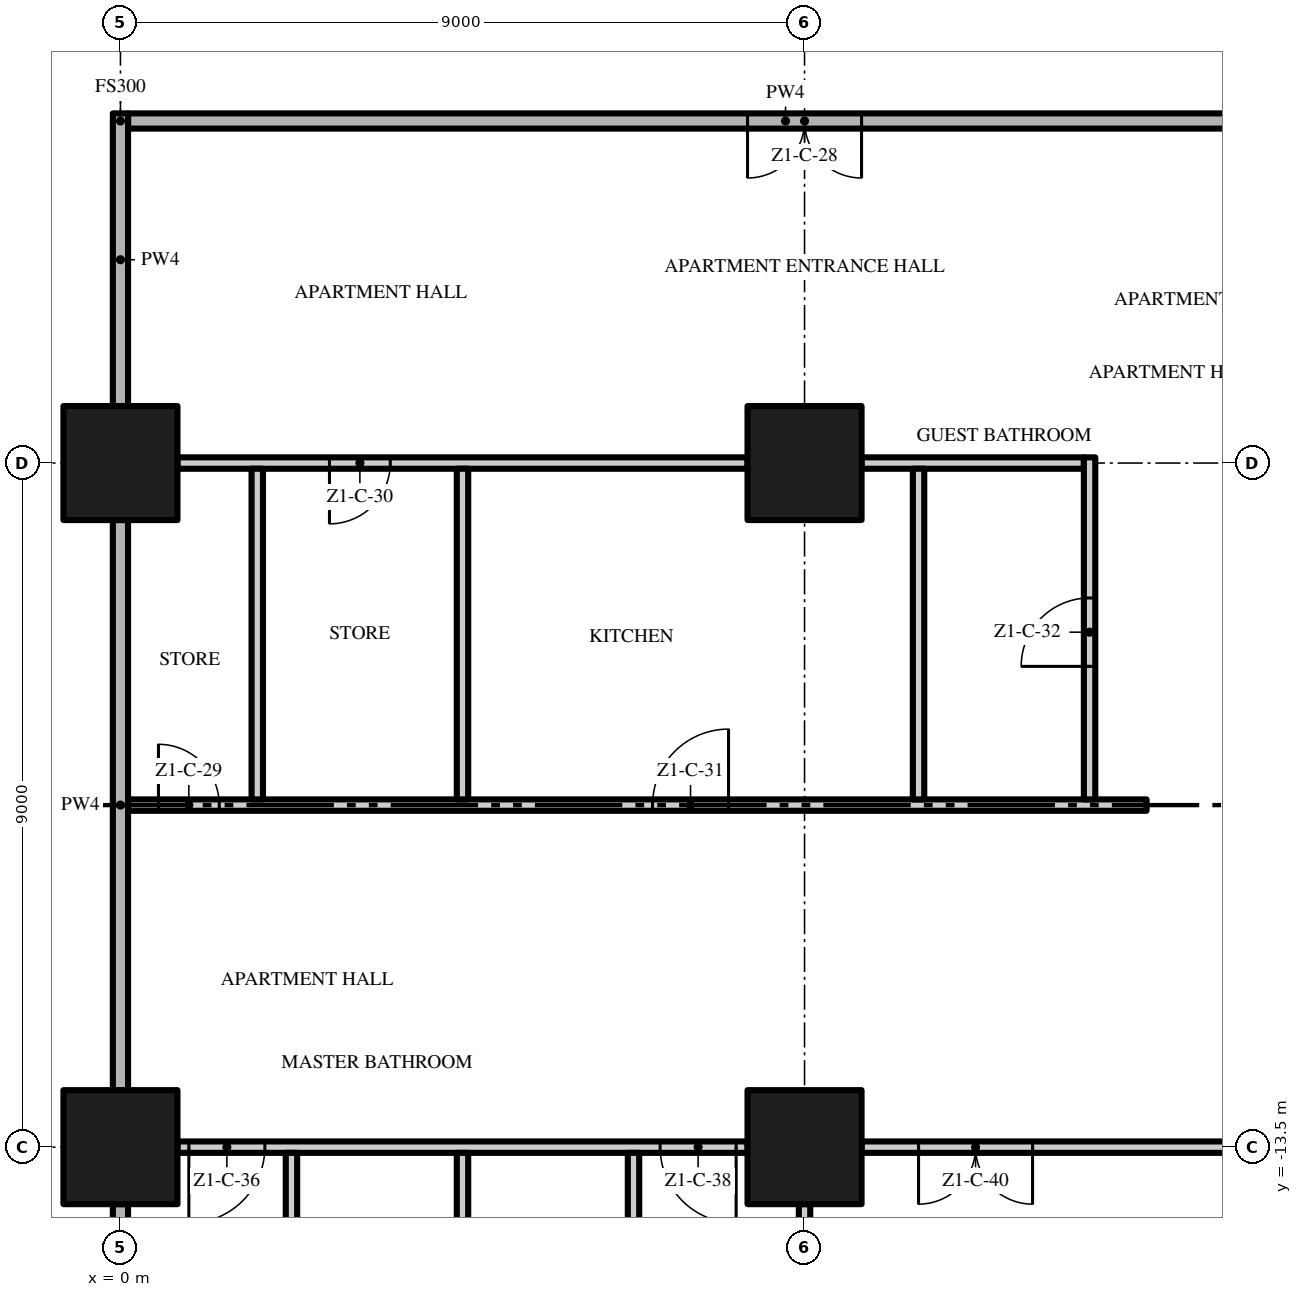
"""IFC4 building model, lengths in metres.
Left out: names, types, materials, properties, quantities, classifications, styles, units other than length and angle.
Written with IfcOpenShell. Run it as: python <this file> out.ifc"""

import sys

from ifc_helpers import new_model, si_unit, direction, frame, frame_2d, origin, origin_2d, place, context, subcontext, project, spatial, rectangle, extrude, element, fill, save


model = new_model("IFC4")
c1 = context("Model", 3, precision=1e-05, world=origin(), true_north=direction((0.0, 1.0)))
c2 = subcontext(c1, "Body", "Model", "MODEL_VIEW")
j1 = project(units=[si_unit("LENGTHUNIT", "METRE"), si_unit("PLANEANGLEUNIT", "RADIAN")], contexts=[c1])
p1 = place(None, origin())
s1 = spatial("IfcSite", under=j1, at=p1, CompositionType="ELEMENT")
p2 = place(p1, origin())
s2 = spatial("IfcBuilding", under=s1, at=p2, CompositionType="ELEMENT")
p3 = place(p2, frame((0.0, 0.0, 45.4)))
s3 = spatial("IfcBuildingStorey", under=s2, at=p3, CompositionType="ELEMENT", Elevation=45.4)
for number, where, z_axis, x_axis in (
    (1, (0.0, -13.5, 0.0), (0.0, 0.0, 1.0), (1.0, 0.0, 0.0)),
    (2, (0.0, -4.5, 0.0), (0.0, 0.0, 1.0), (1.0, 0.0, 0.0)),
    (3, (9.0, -13.5, 0.0), (0.0, 0.0, 1.0), (1.0, 0.0, 0.0)),
    (4, (9.0, -4.5, 0.0), (0.0, 0.0, 1.0), (1.0, 0.0, 0.0)),
):
    element("IfcColumn", number, at=place(p3, frame(where, z_axis=z_axis, x_axis=x_axis)), inside=s3, PredefinedType="COLUMN", context=c2, shape_type="SweptSolid", body=[
        extrude(rectangle(XDim=1.5, YDim=1.5, at=origin_2d()), origin(), (0.0, 0.0, 1.0), 3.5),
    ])
p4 = place(p3, frame((8.25, -13.5, 0.0), z_axis=(0.0, 0.0, 1.0), x_axis=(-1.0, 0.0, 0.0)))
e5 = element("IfcWall", 5, at=p4, inside=s3, PredefinedType="PARTITIONING", context=c2, shape_type="SweptSolid", body=[
    extrude(rectangle(XDim=7.5, YDim=0.15, at=frame_2d((3.75, 0.0))), origin(), (0.0, 0.0, 1.0), 3.5),
])
p5 = place(p4, frame((6.35, 0.0, 0.0)))
e6 = element("IfcOpeningElement", 6, at=p5, cuts=e5, PredefinedType="OPENING", context=c2, shape_type="SweptSolid", body=[
    extrude(rectangle(XDim=1.0, YDim=2.4, at=frame_2d((0.5, 1.2))), frame((0.0, 0.085, 0.0), z_axis=(0.0, -1.0, 0.0), x_axis=(1.0, 0.0, 0.0)), (0.0, 0.0, 1.0), 0.17),
])
p6 = place(p4, frame((0.15, 0.0, 0.0)))
e7 = element("IfcOpeningElement", 7, at=p6, cuts=e5, PredefinedType="OPENING", context=c2, shape_type="SweptSolid", body=[
    extrude(rectangle(XDim=1.0, YDim=2.4, at=frame_2d((0.5, 1.2))), frame((0.0, 0.085, 0.0), z_axis=(0.0, -1.0, 0.0), x_axis=(1.0, 0.0, 0.0)), (0.0, 0.0, 1.0), 0.17),
])
p7 = place(p3, frame((17.25, -13.5, 0.0), z_axis=(0.0, 0.0, 1.0), x_axis=(-1.0, 0.0, 0.0)))
e8 = element("IfcWall", 8, at=p7, inside=s3, PredefinedType="PARTITIONING", context=c2, shape_type="SweptSolid", body=[
    extrude(rectangle(XDim=7.5, YDim=0.15, at=frame_2d((3.75, 0.0))), origin(), (0.0, 0.0, 1.0), 3.5),
])
p8 = place(p7, frame((5.25, 0.0, 0.0)))
e9 = element("IfcOpeningElement", 9, at=p8, cuts=e8, PredefinedType="OPENING", context=c2, shape_type="SweptSolid", body=[
    extrude(rectangle(XDim=1.5, YDim=2.4, at=frame_2d((0.75, 1.2))), frame((0.0, 0.085, 0.0), z_axis=(0.0, -1.0, 0.0), x_axis=(1.0, 0.0, 0.0)), (0.0, 0.0, 1.0), 0.17),
])
p9 = place(p3, frame((0.1, -9.0, 0.0), z_axis=(0.0, 0.0, 1.0), x_axis=(1.0, 0.0, 0.0)))
e10 = element("IfcWall", 10, at=p9, inside=s3, PredefinedType="PARTITIONING", context=c2, shape_type="SweptSolid", body=[
    extrude(rectangle(XDim=13.4, YDim=0.15, at=frame_2d((6.7, 0.0))), origin(), (0.0, 0.0, 1.0), 3.5),
])
p10 = place(p9, frame((0.4, 0.0, 0.0)))
e11 = element("IfcOpeningElement", 11, at=p10, cuts=e10, PredefinedType="OPENING", context=c2, shape_type="SweptSolid", body=[
    extrude(rectangle(XDim=0.8, YDim=2.0, at=frame_2d((0.4, 1.0))), frame((0.0, 0.085, 0.0), z_axis=(0.0, -1.0, 0.0), x_axis=(1.0, 0.0, 0.0)), (0.0, 0.0, 1.0), 0.17),
])
p11 = place(p9, frame((6.9, 0.0, 0.0)))
e12 = element("IfcOpeningElement", 12, at=p11, cuts=e10, PredefinedType="OPENING", context=c2, shape_type="SweptSolid", body=[
    extrude(rectangle(XDim=1.0, YDim=2.4, at=frame_2d((0.5, 1.2))), frame((0.0, 0.085, 0.0), z_axis=(0.0, -1.0, 0.0), x_axis=(1.0, 0.0, 0.0)), (0.0, 0.0, 1.0), 0.17),
])
p12 = place(p3, frame((8.25, -4.5, 0.0), z_axis=(0.0, 0.0, 1.0), x_axis=(-1.0, 0.0, 0.0)))
e13 = element("IfcWall", 13, at=p12, inside=s3, PredefinedType="PARTITIONING", context=c2, shape_type="SweptSolid", body=[
    extrude(rectangle(XDim=7.5, YDim=0.15, at=frame_2d((3.75, 0.0))), origin(), (0.0, 0.0, 1.0), 3.5),
])
p13 = place(p12, frame((4.7, 0.0, 0.0)))
e14 = element("IfcOpeningElement", 14, at=p13, cuts=e13, PredefinedType="OPENING", context=c2, shape_type="SweptSolid", body=[
    extrude(rectangle(XDim=0.8, YDim=2.0, at=frame_2d((0.4, 1.0))), frame((0.0, 0.085, 0.0), z_axis=(0.0, -1.0, 0.0), x_axis=(1.0, 0.0, 0.0)), (0.0, 0.0, 1.0), 0.17),
])
p14 = place(p3, frame((9.75, -4.5, 0.0), z_axis=(0.0, 0.0, 1.0), x_axis=(1.0, 0.0, 0.0)))
e15 = element("IfcWall", 15, at=p14, inside=s3, PredefinedType="PARTITIONING", context=c2, shape_type="SweptSolid", body=[
    extrude(rectangle(XDim=2.925, YDim=0.15, at=frame_2d((1.462, 0.0))), origin(), (0.0, 0.0, 1.0), 3.5),
])
p15 = place(p3, frame((17.4, 0.0, 0.0), z_axis=(0.0, 0.0, 1.0), x_axis=(-1.0, 0.0, 0.0)))
e16 = element("IfcWall", 16, at=p15, inside=s3, PredefinedType="PARTITIONING", context=c2, shape_type="SweptSolid", body=[
    extrude(rectangle(XDim=17.3, YDim=0.2, at=frame_2d((8.65, 0.0))), origin(), (0.0, 0.0, 1.0), 3.5),
])
p16 = place(p15, frame((7.65, 0.0, 0.0)))
e17 = element("IfcOpeningElement", 17, at=p16, cuts=e16, PredefinedType="OPENING", context=c2, shape_type="SweptSolid", body=[
    extrude(rectangle(XDim=1.5, YDim=2.4, at=frame_2d((0.75, 1.2))), frame((0.0, 0.11, 0.0), z_axis=(0.0, -1.0, 0.0), x_axis=(1.0, 0.0, 0.0)), (0.0, 0.0, 1.0), 0.22),
])
p17 = place(p3, frame((0.0, -21.1, 0.0), z_axis=(0.0, 0.0, 1.0), x_axis=(0.0, 1.0, 0.0)))
e18 = element("IfcWall", 18, at=p17, inside=s3, PredefinedType="PARTITIONING", context=c2, shape_type="SweptSolid", body=[
    extrude(rectangle(XDim=6.85, YDim=0.2, at=frame_2d((3.425, 0.0))), origin(), (0.0, 0.0, 1.0), 3.5),
])
p18 = place(p3, frame((0.0, -12.75, 0.0), z_axis=(0.0, 0.0, 1.0), x_axis=(0.0, 1.0, 0.0)))
e19 = element("IfcWall", 19, at=p18, inside=s3, PredefinedType="PARTITIONING", context=c2, shape_type="SweptSolid", body=[
    extrude(rectangle(XDim=7.5, YDim=0.2, at=frame_2d((3.75, 0.0))), origin(), (0.0, 0.0, 1.0), 3.5),
])
p19 = place(p3, frame((0.0, -3.75, 0.0), z_axis=(0.0, 0.0, 1.0), x_axis=(0.0, 1.0, 0.0)))
e20 = element("IfcWall", 20, at=p19, inside=s3, PredefinedType="PARTITIONING", context=c2, shape_type="SweptSolid", body=[
    extrude(rectangle(XDim=3.85, YDim=0.2, at=frame_2d((1.925, 0.0))), origin(), (0.0, 0.0, 1.0), 3.5),
])
p20 = place(p3, frame((1.8, -8.925, 0.0), z_axis=(0.0, 0.0, 1.0), x_axis=(0.0, 1.0, 0.0)))
e21 = element("IfcWall", 21, at=p20, inside=s3, PredefinedType="PARTITIONING", context=c2, shape_type="SweptSolid", body=[
    extrude(rectangle(XDim=4.35, YDim=0.15, at=frame_2d((2.175, 0.0))), origin(), (0.0, 0.0, 1.0), 3.5),
])
p21 = place(p3, frame((2.25, -16.575, 0.0), z_axis=(0.0, 0.0, 1.0), x_axis=(0.0, 1.0, 0.0)))
e22 = element("IfcWall", 22, at=p21, inside=s3, PredefinedType="PARTITIONING", context=c2, shape_type="SweptSolid", body=[
    extrude(rectangle(XDim=3.0, YDim=0.15, at=frame_2d((1.5, 0.0))), origin(), (0.0, 0.0, 1.0), 3.5),
])
p22 = place(p3, frame((4.5, -22.2, 0.0), z_axis=(0.0, 0.0, 1.0), x_axis=(0.0, 1.0, 0.0)))
e23 = element("IfcWall", 23, at=p22, inside=s3, PredefinedType="PARTITIONING", context=c2, shape_type="SweptSolid", body=[
    extrude(rectangle(XDim=8.625, YDim=0.15, at=frame_2d((4.312, 0.0))), origin(), (0.0, 0.0, 1.0), 3.5),
])
p23 = place(p3, frame((4.5, -8.925, 0.0), z_axis=(0.0, 0.0, 1.0), x_axis=(0.0, 1.0, 0.0)))
e24 = element("IfcWall", 24, at=p23, inside=s3, PredefinedType="PARTITIONING", context=c2, shape_type="SweptSolid", body=[
    extrude(rectangle(XDim=4.35, YDim=0.15, at=frame_2d((2.175, 0.0))), origin(), (0.0, 0.0, 1.0), 3.5),
])
p24 = place(p3, frame((6.75, -16.575, 0.0), z_axis=(0.0, 0.0, 1.0), x_axis=(0.0, 1.0, 0.0)))
e25 = element("IfcWall", 25, at=p24, inside=s3, PredefinedType="PARTITIONING", context=c2, shape_type="SweptSolid", body=[
    extrude(rectangle(XDim=3.0, YDim=0.15, at=frame_2d((1.5, 0.0))), origin(), (0.0, 0.0, 1.0), 3.5),
])
p25 = place(p3, frame((9.0, -21.1, 0.0), z_axis=(0.0, 0.0, 1.0), x_axis=(0.0, 1.0, 0.0)))
e26 = element("IfcWall", 26, at=p25, inside=s3, PredefinedType="PARTITIONING", context=c2, shape_type="SweptSolid", body=[
    extrude(rectangle(XDim=6.85, YDim=0.15, at=frame_2d((3.425, 0.0))), origin(), (0.0, 0.0, 1.0), 3.5),
])
p26 = place(p3, frame((10.5, -8.925, 0.0), z_axis=(0.0, 0.0, 1.0), x_axis=(0.0, 1.0, 0.0)))
e27 = element("IfcWall", 27, at=p26, inside=s3, PredefinedType="PARTITIONING", context=c2, shape_type="SweptSolid", body=[
    extrude(rectangle(XDim=4.35, YDim=0.15, at=frame_2d((2.175, 0.0))), origin(), (0.0, 0.0, 1.0), 3.5),
])
p27 = place(p3, frame((12.75, -8.925, 0.0), z_axis=(0.0, 0.0, 1.0), x_axis=(0.0, 1.0, 0.0)))
e28 = element("IfcWall", 28, at=p27, inside=s3, PredefinedType="PARTITIONING", context=c2, shape_type="SweptSolid", body=[
    extrude(rectangle(XDim=4.5, YDim=0.15, at=frame_2d((2.25, 0.0))), origin(), (0.0, 0.0, 1.0), 3.5),
])
p28 = place(p27, frame((1.75, 0.0, 0.0)))
e29 = element("IfcOpeningElement", 29, at=p28, cuts=e28, PredefinedType="OPENING", context=c2, shape_type="SweptSolid", body=[
    extrude(rectangle(XDim=0.9, YDim=2.1, at=frame_2d((0.45, 1.05))), frame((0.0, 0.085, 0.0), z_axis=(0.0, -1.0, 0.0), x_axis=(1.0, 0.0, 0.0)), (0.0, 0.0, 1.0), 0.17),
])
p29 = place(p16, origin())
e30 = element("IfcDoor", 30, at=p29, inside=s3, OperationType="DOUBLE_DOOR_SINGLE_SWING", PredefinedType="DOOR", context=c2, shape_type="SweptSolid", body=[
    extrude(rectangle(XDim=1.5, YDim=2.4, at=frame_2d((0.75, 1.2))), frame((0.0, 0.025, 0.0), z_axis=(0.0, -1.0, 0.0), x_axis=(1.0, 0.0, 0.0)), (0.0, 0.0, 1.0), 0.05),
])
fill(e17, e30)
p30 = place(p10, origin())
e31 = element("IfcDoor", 31, at=p30, inside=s3, OperationType="SINGLE_SWING_LEFT", PredefinedType="DOOR", context=c2, shape_type="SweptSolid", body=[
    extrude(rectangle(XDim=0.8, YDim=2.0, at=frame_2d((0.4, 1.0))), frame((0.0, 0.025, 0.0), z_axis=(0.0, -1.0, 0.0), x_axis=(1.0, 0.0, 0.0)), (0.0, 0.0, 1.0), 0.05),
])
fill(e11, e31)
p31 = place(p13, origin())
e32 = element("IfcDoor", 32, at=p31, inside=s3, OperationType="SINGLE_SWING_RIGHT", PredefinedType="DOOR", context=c2, shape_type="SweptSolid", body=[
    extrude(rectangle(XDim=0.8, YDim=2.0, at=frame_2d((0.4, 1.0))), frame((0.0, 0.025, 0.0), z_axis=(0.0, -1.0, 0.0), x_axis=(1.0, 0.0, 0.0)), (0.0, 0.0, 1.0), 0.05),
])
fill(e14, e32)
p32 = place(p11, origin())
e33 = element("IfcDoor", 33, at=p32, inside=s3, OperationType="SINGLE_SWING_RIGHT", PredefinedType="DOOR", context=c2, shape_type="SweptSolid", body=[
    extrude(rectangle(XDim=1.0, YDim=2.4, at=frame_2d((0.5, 1.2))), frame((0.0, 0.025, 0.0), z_axis=(0.0, -1.0, 0.0), x_axis=(1.0, 0.0, 0.0)), (0.0, 0.0, 1.0), 0.05),
])
fill(e12, e33)
p33 = place(p28, origin())
e34 = element("IfcDoor", 34, at=p33, inside=s3, OperationType="SINGLE_SWING_LEFT", PredefinedType="DOOR", context=c2, shape_type="SweptSolid", body=[
    extrude(rectangle(XDim=0.9, YDim=2.1, at=frame_2d((0.45, 1.05))), frame((0.0, 0.025, 0.0), z_axis=(0.0, -1.0, 0.0), x_axis=(1.0, 0.0, 0.0)), (0.0, 0.0, 1.0), 0.05),
])
fill(e29, e34)
p34 = place(p5, origin())
e35 = element("IfcDoor", 35, at=p34, inside=s3, OperationType="SINGLE_SWING_RIGHT", PredefinedType="DOOR", context=c2, shape_type="SweptSolid", body=[
    extrude(rectangle(XDim=1.0, YDim=2.4, at=frame_2d((0.5, 1.2))), frame((0.0, 0.025, 0.0), z_axis=(0.0, -1.0, 0.0), x_axis=(1.0, 0.0, 0.0)), (0.0, 0.0, 1.0), 0.05),
])
fill(e6, e35)
p35 = place(p6, origin())
e36 = element("IfcDoor", 36, at=p35, inside=s3, OperationType="SINGLE_SWING_LEFT", PredefinedType="DOOR", context=c2, shape_type="SweptSolid", body=[
    extrude(rectangle(XDim=1.0, YDim=2.4, at=frame_2d((0.5, 1.2))), frame((0.0, 0.025, 0.0), z_axis=(0.0, -1.0, 0.0), x_axis=(1.0, 0.0, 0.0)), (0.0, 0.0, 1.0), 0.05),
])
fill(e7, e36)
p36 = place(p8, origin())
e37 = element("IfcDoor", 37, at=p36, inside=s3, OperationType="DOUBLE_DOOR_SINGLE_SWING", PredefinedType="DOOR", context=c2, shape_type="SweptSolid", body=[
    extrude(rectangle(XDim=1.5, YDim=2.4, at=frame_2d((0.75, 1.2))), frame((0.0, 0.025, 0.0), z_axis=(0.0, -1.0, 0.0), x_axis=(1.0, 0.0, 0.0)), (0.0, 0.0, 1.0), 0.05),
])
fill(e9, e37)
save(model, sys.argv[1])
